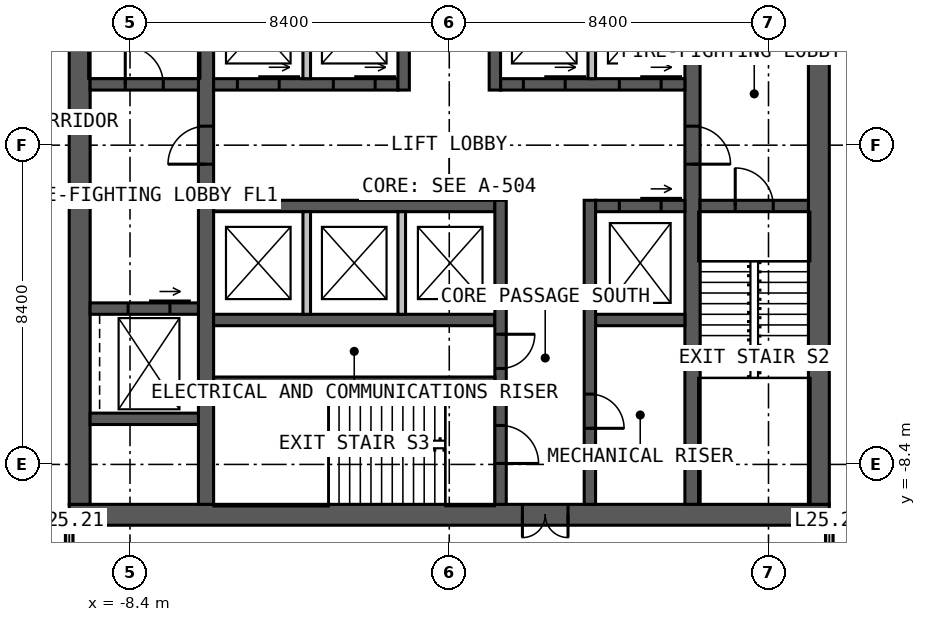
"""IFC4 building model, lengths in metres.
Left out: names, types, materials, properties, quantities, classifications, styles, units other than length and angle.
Written with IfcOpenShell. Run it as: python <this file> out.ifc"""

import sys

from ifc_helpers import new_model, si_unit, direction, frame, frame_2d, origin, place, context, subcontext, project, spatial, rectangle, extrude, element, fill, save


model = new_model("IFC4")
c1 = context("Model", 3, precision=1e-05, world=origin(), true_north=direction((0.0, 1.0)))
c2 = subcontext(c1, "Body", "Model", "MODEL_VIEW")
j1 = project(units=[si_unit("LENGTHUNIT", "METRE"), si_unit("PLANEANGLEUNIT", "RADIAN")], contexts=[c1])
p1 = place(None, origin())
s1 = spatial("IfcSite", under=j1, at=p1, CompositionType="ELEMENT")
p2 = place(p1, origin())
s2 = spatial("IfcBuilding", under=s1, at=p2, CompositionType="ELEMENT")
p3 = place(p2, frame((0.0, 0.0, 106.0)))
s3 = spatial("IfcBuildingStorey", under=s2, at=p3, CompositionType="ELEMENT", Elevation=106.0)
p4 = place(p3, frame((10.0, -9.725, 0.0), z_axis=(0.0, 0.0, 1.0), x_axis=(-1.0, 0.0, 0.0)))
e1 = element("IfcWall", 1, at=p4, inside=s3, PredefinedType="SOLIDWALL", context=c2, shape_type="SweptSolid", body=[
    extrude(rectangle(XDim=20.0, YDim=0.55, at=frame_2d((10.0, 0.0))), origin(), (0.0, 0.0, 1.0), 4.0),
])
p5 = place(p4, frame((6.875, 0.0, 0.0)))
e2 = element("IfcOpeningElement", 2, at=p5, cuts=e1, PredefinedType="OPENING", context=c2, shape_type="SweptSolid", body=[
    extrude(rectangle(XDim=1.2, YDim=2.2, at=frame_2d((0.6, 1.1))), frame((0.0, 0.285, 0.0), z_axis=(0.0, -1.0, 0.0), x_axis=(1.0, 0.0, 0.0)), (0.0, 0.0, 1.0), 0.57),
])
for number, where, z_axis, x_axis in (
    (3, (9.725, -9.45, 0.0), (0.0, 0.0, 1.0), (0.0, 1.0, 0.0)),
    (4, (-9.725, 9.45, 0.0), (0.0, 0.0, 1.0), (0.0, -1.0, 0.0)),
):
    element("IfcWall", number, at=place(p3, frame(where, z_axis=z_axis, x_axis=x_axis)), inside=s3, PredefinedType="SOLIDWALL", context=c2, shape_type="SweptSolid", body=[
        extrude(rectangle(XDim=18.9, YDim=0.55, at=frame_2d((9.45, 0.0))), origin(), (0.0, 0.0, 1.0), 4.0),
    ])
p6 = place(p3, frame((-6.4, -9.45, 0.0), z_axis=(0.0, 0.0, 1.0), x_axis=(0.0, 1.0, 0.0)))
e5 = element("IfcWall", 5, at=p6, inside=s3, PredefinedType="SOLIDWALL", context=c2, shape_type="SweptSolid", body=[
    extrude(rectangle(XDim=18.9, YDim=0.4, at=frame_2d((9.45, 0.0))), origin(), (0.0, 0.0, 1.0), 4.0),
])
p7 = place(p6, frame((8.95, 0.0, 0.0)))
e6 = element("IfcOpeningElement", 6, at=p7, cuts=e5, PredefinedType="OPENING", context=c2, shape_type="SweptSolid", body=[
    extrude(rectangle(XDim=1.0, YDim=2.2, at=frame_2d((0.5, 1.1))), frame((0.0, 0.21, 0.0), z_axis=(0.0, -1.0, 0.0), x_axis=(1.0, 0.0, 0.0)), (0.0, 0.0, 1.0), 0.42),
])
p8 = place(p3, frame((6.4, 9.45, 0.0), z_axis=(0.0, 0.0, 1.0), x_axis=(0.0, -1.0, 0.0)))
e7 = element("IfcWall", 7, at=p8, inside=s3, PredefinedType="SOLIDWALL", context=c2, shape_type="SweptSolid", body=[
    extrude(rectangle(XDim=18.9, YDim=0.4, at=frame_2d((9.45, 0.0))), origin(), (0.0, 0.0, 1.0), 4.0),
])
p9 = place(p8, frame((8.95, 0.0, 0.0)))
e8 = element("IfcOpeningElement", 8, at=p9, cuts=e7, PredefinedType="OPENING", context=c2, shape_type="SweptSolid", body=[
    extrude(rectangle(XDim=1.0, YDim=2.2, at=frame_2d((0.5, 1.1))), frame((0.0, 0.21, 0.0), z_axis=(0.0, -1.0, 0.0), x_axis=(1.0, 0.0, 0.0)), (0.0, 0.0, 1.0), 0.42),
])
p10 = place(p3, frame((-6.2, 1.6, 0.0), z_axis=(0.0, 0.0, 1.0), x_axis=(1.0, 0.0, 0.0)))
e9 = element("IfcWall", 9, at=p10, inside=s3, PredefinedType="SOLIDWALL", context=c2, shape_type="SweptSolid", body=[
    extrude(rectangle(XDim=4.85, YDim=0.3, at=frame_2d((2.425, 0.0))), origin(), (0.0, 0.0, 1.0), 4.0),
])
p11 = place(p10, frame((0.625, 0.0, 0.0)))
e10 = element("IfcOpeningElement", 10, at=p11, cuts=e9, PredefinedType="OPENING", context=c2, shape_type="SweptSolid", body=[
    extrude(rectangle(XDim=1.1, YDim=2.2, at=frame_2d((0.55, 1.1))), frame((0.0, 0.16, 0.0), z_axis=(0.0, -1.0, 0.0), x_axis=(1.0, 0.0, 0.0)), (0.0, 0.0, 1.0), 0.32),
])
p12 = place(p10, frame((3.15, 0.0, 0.0)))
e11 = element("IfcOpeningElement", 11, at=p12, cuts=e9, PredefinedType="OPENING", context=c2, shape_type="SweptSolid", body=[
    extrude(rectangle(XDim=1.1, YDim=2.2, at=frame_2d((0.55, 1.1))), frame((0.0, 0.16, 0.0), z_axis=(0.0, -1.0, 0.0), x_axis=(1.0, 0.0, 0.0)), (0.0, 0.0, 1.0), 0.32),
])
p13 = place(p3, frame((1.35, 1.6, 0.0), z_axis=(0.0, 0.0, 1.0), x_axis=(1.0, 0.0, 0.0)))
e12 = element("IfcWall", 12, at=p13, inside=s3, PredefinedType="SOLIDWALL", context=c2, shape_type="SweptSolid", body=[
    extrude(rectangle(XDim=4.85, YDim=0.3, at=frame_2d((2.425, 0.0))), origin(), (0.0, 0.0, 1.0), 4.0),
])
p14 = place(p13, frame((0.6, 0.0, 0.0)))
e13 = element("IfcOpeningElement", 13, at=p14, cuts=e12, PredefinedType="OPENING", context=c2, shape_type="SweptSolid", body=[
    extrude(rectangle(XDim=1.1, YDim=2.2, at=frame_2d((0.55, 1.1))), frame((0.0, 0.16, 0.0), z_axis=(0.0, -1.0, 0.0), x_axis=(1.0, 0.0, 0.0)), (0.0, 0.0, 1.0), 0.32),
])
p15 = place(p13, frame((3.125, 0.0, 0.0)))
e14 = element("IfcOpeningElement", 14, at=p15, cuts=e12, PredefinedType="OPENING", context=c2, shape_type="SweptSolid", body=[
    extrude(rectangle(XDim=1.1, YDim=2.2, at=frame_2d((0.55, 1.1))), frame((0.0, 0.16, 0.0), z_axis=(0.0, -1.0, 0.0), x_axis=(1.0, 0.0, 0.0)), (0.0, 0.0, 1.0), 0.32),
])
p16 = place(p3, frame((-1.2, 1.45, 0.0), z_axis=(0.0, 0.0, 1.0), x_axis=(0.0, 1.0, 0.0)))
e15 = element("IfcWall", 15, at=p16, inside=s3, PredefinedType="SOLIDWALL", context=c2, shape_type="SweptSolid", body=[
    extrude(rectangle(XDim=8.0, YDim=0.3, at=frame_2d((4.0, 0.0))), origin(), (0.0, 0.0, 1.0), 4.0),
])
p17 = place(p16, frame((5.05, 0.0, 0.0)))
e16 = element("IfcOpeningElement", 16, at=p17, cuts=e15, PredefinedType="OPENING", context=c2, shape_type="SweptSolid", body=[
    extrude(rectangle(XDim=1.0, YDim=2.2, at=frame_2d((0.5, 1.1))), frame((0.0, 0.16, 0.0), z_axis=(0.0, -1.0, 0.0), x_axis=(1.0, 0.0, 0.0)), (0.0, 0.0, 1.0), 0.32),
])
p18 = place(p3, frame((1.2, 1.45, 0.0), z_axis=(0.0, 0.0, 1.0), x_axis=(0.0, 1.0, 0.0)))
e17 = element("IfcWall", 17, at=p18, inside=s3, PredefinedType="SOLIDWALL", context=c2, shape_type="SweptSolid", body=[
    extrude(rectangle(XDim=8.0, YDim=0.3, at=frame_2d((4.0, 0.0))), origin(), (0.0, 0.0, 1.0), 4.0),
])
p19 = place(p18, frame((3.8, 0.0, 0.0)))
e18 = element("IfcOpeningElement", 18, at=p19, cuts=e17, PredefinedType="OPENING", context=c2, shape_type="SweptSolid", body=[
    extrude(rectangle(XDim=1.0, YDim=2.2, at=frame_2d((0.5, 1.1))), frame((0.0, 0.16, 0.0), z_axis=(0.0, -1.0, 0.0), x_axis=(1.0, 0.0, 0.0)), (0.0, 0.0, 1.0), 0.32),
])
p20 = place(p18, frame((6.15, 0.0, 0.0)))
e19 = element("IfcOpeningElement", 19, at=p20, cuts=e17, PredefinedType="OPENING", context=c2, shape_type="SweptSolid", body=[
    extrude(rectangle(XDim=1.0, YDim=2.2, at=frame_2d((0.5, 1.1))), frame((0.0, 0.16, 0.0), z_axis=(0.0, -1.0, 0.0), x_axis=(1.0, 0.0, 0.0)), (0.0, 0.0, 1.0), 0.32),
])
p21 = place(p3, frame((-6.2, -1.6, 0.0), z_axis=(0.0, 0.0, 1.0), x_axis=(1.0, 0.0, 0.0)))
e20 = element("IfcWall", 20, at=p21, inside=s3, PredefinedType="SOLIDWALL", context=c2, shape_type="SweptSolid", body=[
    extrude(rectangle(XDim=7.4, YDim=0.3, at=frame_2d((3.7, 0.0))), origin(), (0.0, 0.0, 1.0), 4.0),
])
p22 = place(p3, frame((3.85, -1.6, 0.0), z_axis=(0.0, 0.0, 1.0), x_axis=(1.0, 0.0, 0.0)))
e21 = element("IfcWall", 21, at=p22, inside=s3, PredefinedType="SOLIDWALL", context=c2, shape_type="SweptSolid", body=[
    extrude(rectangle(XDim=2.35, YDim=0.3, at=frame_2d((1.175, 0.0))), origin(), (0.0, 0.0, 1.0), 4.0),
])
p23 = place(p22, frame((0.625, 0.0, 0.0)))
e22 = element("IfcOpeningElement", 22, at=p23, cuts=e21, PredefinedType="OPENING", context=c2, shape_type="SweptSolid", body=[
    extrude(rectangle(XDim=1.1, YDim=2.2, at=frame_2d((0.55, 1.1))), frame((0.0, 0.16, 0.0), z_axis=(0.0, -1.0, 0.0), x_axis=(1.0, 0.0, 0.0)), (0.0, 0.0, 1.0), 0.32),
])
p24 = place(p3, frame((-6.2, -4.6, 0.0), z_axis=(0.0, 0.0, 1.0), x_axis=(1.0, 0.0, 0.0)))
e23 = element("IfcWall", 23, at=p24, inside=s3, PredefinedType="SOLIDWALL", context=c2, shape_type="SweptSolid", body=[
    extrude(rectangle(XDim=7.4, YDim=0.3, at=frame_2d((3.7, 0.0))), origin(), (0.0, 0.0, 1.0), 4.0),
])
p25 = place(p3, frame((3.85, -4.6, 0.0), z_axis=(0.0, 0.0, 1.0), x_axis=(1.0, 0.0, 0.0)))
e24 = element("IfcWall", 24, at=p25, inside=s3, PredefinedType="SOLIDWALL", context=c2, shape_type="SweptSolid", body=[
    extrude(rectangle(XDim=2.35, YDim=0.3, at=frame_2d((1.175, 0.0))), origin(), (0.0, 0.0, 1.0), 4.0),
])
p26 = place(p3, frame((1.35, -1.45, 0.0), z_axis=(0.0, 0.0, 1.0), x_axis=(0.0, -1.0, 0.0)))
e25 = element("IfcWall", 25, at=p26, inside=s3, PredefinedType="SOLIDWALL", context=c2, shape_type="SweptSolid", body=[
    extrude(rectangle(XDim=8.0, YDim=0.3, at=frame_2d((4.0, 0.0))), origin(), (0.0, 0.0, 1.0), 4.0),
])
p27 = place(p26, frame((5.925, 0.0, 0.0)))
e26 = element("IfcOpeningElement", 26, at=p27, cuts=e25, PredefinedType="OPENING", context=c2, shape_type="SweptSolid", body=[
    extrude(rectangle(XDim=1.0, YDim=2.2, at=frame_2d((0.5, 1.1))), frame((0.0, 0.16, 0.0), z_axis=(0.0, -1.0, 0.0), x_axis=(1.0, 0.0, 0.0)), (0.0, 0.0, 1.0), 0.32),
])
p28 = place(p26, frame((3.525, 0.0, 0.0)))
e27 = element("IfcOpeningElement", 27, at=p28, cuts=e25, PredefinedType="OPENING", context=c2, shape_type="SweptSolid", body=[
    extrude(rectangle(XDim=0.9, YDim=2.2, at=frame_2d((0.45, 1.1))), frame((0.0, 0.16, 0.0), z_axis=(0.0, -1.0, 0.0), x_axis=(1.0, 0.0, 0.0)), (0.0, 0.0, 1.0), 0.32),
])
p29 = place(p3, frame((3.7, -1.45, 0.0), z_axis=(0.0, 0.0, 1.0), x_axis=(0.0, -1.0, 0.0)))
e28 = element("IfcWall", 28, at=p29, inside=s3, PredefinedType="SOLIDWALL", context=c2, shape_type="SweptSolid", body=[
    extrude(rectangle(XDim=8.0, YDim=0.3, at=frame_2d((4.0, 0.0))), origin(), (0.0, 0.0, 1.0), 4.0),
])
p30 = place(p29, frame((5.1, 0.0, 0.0)))
e29 = element("IfcOpeningElement", 29, at=p30, cuts=e28, PredefinedType="OPENING", context=c2, shape_type="SweptSolid", body=[
    extrude(rectangle(XDim=0.9, YDim=2.2, at=frame_2d((0.45, 1.1))), frame((0.0, 0.16, 0.0), z_axis=(0.0, -1.0, 0.0), x_axis=(1.0, 0.0, 0.0)), (0.0, 0.0, 1.0), 0.32),
])
p31 = place(p3, frame((-6.2, -6.2, 0.0), z_axis=(0.0, 0.0, 1.0), x_axis=(1.0, 0.0, 0.0)))
e30 = element("IfcWall", 30, at=p31, inside=s3, PredefinedType="SOLIDWALL", context=c2, shape_type="SweptSolid", body=[
    extrude(rectangle(XDim=7.4, YDim=0.2, at=frame_2d((3.7, 0.0))), origin(), (0.0, 0.0, 1.0), 4.0),
])
p32 = place(p3, frame((-9.45, 1.6, 0.0), z_axis=(0.0, 0.0, 1.0), x_axis=(1.0, 0.0, 0.0)))
e31 = element("IfcWall", 31, at=p32, inside=s3, PredefinedType="SOLIDWALL", context=c2, shape_type="SweptSolid", body=[
    extrude(rectangle(XDim=2.85, YDim=0.3, at=frame_2d((1.425, 0.0))), origin(), (0.0, 0.0, 1.0), 4.0),
])
p33 = place(p32, frame((0.925, 0.0, 0.0)))
e32 = element("IfcOpeningElement", 32, at=p33, cuts=e31, PredefinedType="OPENING", context=c2, shape_type="SweptSolid", body=[
    extrude(rectangle(XDim=1.0, YDim=2.2, at=frame_2d((0.5, 1.1))), frame((0.0, 0.16, 0.0), z_axis=(0.0, -1.0, 0.0), x_axis=(1.0, 0.0, 0.0)), (0.0, 0.0, 1.0), 0.32),
])
p34 = place(p3, frame((6.6, -1.6, 0.0), z_axis=(0.0, 0.0, 1.0), x_axis=(1.0, 0.0, 0.0)))
e33 = element("IfcWall", 33, at=p34, inside=s3, PredefinedType="SOLIDWALL", context=c2, shape_type="SweptSolid", body=[
    extrude(rectangle(XDim=2.85, YDim=0.3, at=frame_2d((1.425, 0.0))), origin(), (0.0, 0.0, 1.0), 4.0),
])
p35 = place(p34, frame((0.925, 0.0, 0.0)))
e34 = element("IfcOpeningElement", 34, at=p35, cuts=e33, PredefinedType="OPENING", context=c2, shape_type="SweptSolid", body=[
    extrude(rectangle(XDim=1.0, YDim=2.2, at=frame_2d((0.5, 1.1))), frame((0.0, 0.16, 0.0), z_axis=(0.0, -1.0, 0.0), x_axis=(1.0, 0.0, 0.0)), (0.0, 0.0, 1.0), 0.32),
])
p36 = place(p3, frame((-9.45, -4.3, 0.0), z_axis=(0.0, 0.0, 1.0), x_axis=(1.0, 0.0, 0.0)))
e35 = element("IfcWall", 35, at=p36, inside=s3, PredefinedType="SOLIDWALL", context=c2, shape_type="SweptSolid", body=[
    extrude(rectangle(XDim=2.85, YDim=0.3, at=frame_2d((1.425, 0.0))), origin(), (0.0, 0.0, 1.0), 4.0),
])
p37 = place(p36, frame((1.0, 0.0, 0.0)))
e36 = element("IfcOpeningElement", 36, at=p37, cuts=e35, PredefinedType="OPENING", context=c2, shape_type="SweptSolid", body=[
    extrude(rectangle(XDim=1.1, YDim=2.2, at=frame_2d((0.55, 1.1))), frame((0.0, 0.16, 0.0), z_axis=(0.0, -1.0, 0.0), x_axis=(1.0, 0.0, 0.0)), (0.0, 0.0, 1.0), 0.32),
])
p38 = place(p3, frame((-9.45, -7.2, 0.0), z_axis=(0.0, 0.0, 1.0), x_axis=(1.0, 0.0, 0.0)))
e37 = element("IfcWall", 37, at=p38, inside=s3, PredefinedType="SOLIDWALL", context=c2, shape_type="SweptSolid", body=[
    extrude(rectangle(XDim=2.85, YDim=0.3, at=frame_2d((1.425, 0.0))), origin(), (0.0, 0.0, 1.0), 4.0),
])
for number, where, z_axis, x_axis in (
    (38, (-3.75, 1.75, 0.0), (0.0, 0.0, 1.0), (0.0, 1.0, 0.0)),
    (39, (3.75, 1.75, 0.0), (0.0, 0.0, 1.0), (0.0, 1.0, 0.0)),
    (40, (-3.75, -1.75, 0.0), (0.0, 0.0, 1.0), (0.0, -1.0, 0.0)),
    (41, (-1.25, -1.75, 0.0), (0.0, 0.0, 1.0), (0.0, -1.0, 0.0)),
):
    element("IfcWall", number, at=place(p3, frame(where, z_axis=z_axis, x_axis=x_axis)), inside=s3, PredefinedType="SOLIDWALL", context=c2, shape_type="SweptSolid", body=[
        extrude(rectangle(XDim=2.7, YDim=0.2, at=frame_2d((1.35, 0.0))), origin(), (0.0, 0.0, 1.0), 3.75),
    ])
p39 = place(p3, frame((10.0, -10.0, 0.0), z_axis=(0.0, 0.0, 1.0), x_axis=(0.0, -1.0, 0.0)))
e42 = element("IfcWall", 42, at=p39, inside=s3, PredefinedType="PARTITIONING", context=c2, shape_type="SweptSolid", body=[
    extrude(rectangle(XDim=2.0, YDim=0.2, at=frame_2d((1.0, 0.0))), origin(), (0.0, 0.0, 1.0), 3.8),
])
p40 = place(p39, frame((0.5, 0.0, 0.0)))
e43 = element("IfcOpeningElement", 43, at=p40, cuts=e42, PredefinedType="OPENING", context=c2, shape_type="SweptSolid", body=[
    extrude(rectangle(XDim=1.0, YDim=2.2, at=frame_2d((0.5, 1.1))), frame((0.0, 0.11, 0.0), z_axis=(0.0, -1.0, 0.0), x_axis=(1.0, 0.0, 0.0)), (0.0, 0.0, 1.0), 0.22),
])
p41 = place(p3, frame((-10.0, -10.0, 0.0), z_axis=(0.0, 0.0, 1.0), x_axis=(0.0, -1.0, 0.0)))
e44 = element("IfcWall", 44, at=p41, inside=s3, PredefinedType="PARTITIONING", context=c2, shape_type="SweptSolid", body=[
    extrude(rectangle(XDim=2.0, YDim=0.2, at=frame_2d((1.0, 0.0))), origin(), (0.0, 0.0, 1.0), 3.8),
])
p42 = place(p41, frame((0.5, 0.0, 0.0)))
e45 = element("IfcOpeningElement", 45, at=p42, cuts=e44, PredefinedType="OPENING", context=c2, shape_type="SweptSolid", body=[
    extrude(rectangle(XDim=1.0, YDim=2.2, at=frame_2d((0.5, 1.1))), frame((0.0, 0.11, 0.0), z_axis=(0.0, -1.0, 0.0), x_axis=(1.0, 0.0, 0.0)), (0.0, 0.0, 1.0), 0.22),
])
p43 = place(p5, origin())
e46 = element("IfcDoor", 46, at=p43, inside=s3, OperationType="DOUBLE_DOOR_SINGLE_SWING", PredefinedType="DOOR", context=c2, shape_type="SweptSolid", body=[
    extrude(rectangle(XDim=1.2, YDim=2.2, at=frame_2d((0.6, 1.1))), frame((0.0, 0.025, 0.0), z_axis=(0.0, -1.0, 0.0), x_axis=(1.0, 0.0, 0.0)), (0.0, 0.0, 1.0), 0.05),
])
fill(e2, e46)
p44 = place(p7, origin())
e47 = element("IfcDoor", 47, at=p44, inside=s3, OperationType="SINGLE_SWING_LEFT", PredefinedType="DOOR", context=c2, shape_type="SweptSolid", body=[
    extrude(rectangle(XDim=1.0, YDim=2.2, at=frame_2d((0.5, 1.1))), frame((0.0, 0.025, 0.0), z_axis=(0.0, -1.0, 0.0), x_axis=(1.0, 0.0, 0.0)), (0.0, 0.0, 1.0), 0.05),
])
fill(e6, e47)
p45 = place(p9, origin())
e48 = element("IfcDoor", 48, at=p45, inside=s3, OperationType="SINGLE_SWING_RIGHT", PredefinedType="DOOR", context=c2, shape_type="SweptSolid", body=[
    extrude(rectangle(XDim=1.0, YDim=2.2, at=frame_2d((0.5, 1.1))), frame((0.0, 0.025, 0.0), z_axis=(0.0, -1.0, 0.0), x_axis=(1.0, 0.0, 0.0)), (0.0, 0.0, 1.0), 0.05),
])
fill(e8, e48)
p46 = place(p33, origin())
e49 = element("IfcDoor", 49, at=p46, inside=s3, OperationType="SINGLE_SWING_LEFT", PredefinedType="DOOR", context=c2, shape_type="SweptSolid", body=[
    extrude(rectangle(XDim=1.0, YDim=2.2, at=frame_2d((0.5, 1.1))), frame((0.0, 0.025, 0.0), z_axis=(0.0, -1.0, 0.0), x_axis=(1.0, 0.0, 0.0)), (0.0, 0.0, 1.0), 0.05),
])
fill(e32, e49)
p47 = place(p35, origin())
e50 = element("IfcDoor", 50, at=p47, inside=s3, OperationType="SINGLE_SWING_LEFT", PredefinedType="DOOR", context=c2, shape_type="SweptSolid", body=[
    extrude(rectangle(XDim=1.0, YDim=2.2, at=frame_2d((0.5, 1.1))), frame((0.0, 0.025, 0.0), z_axis=(0.0, -1.0, 0.0), x_axis=(1.0, 0.0, 0.0)), (0.0, 0.0, 1.0), 0.05),
])
fill(e34, e50)
p48 = place(p27, origin())
e51 = element("IfcDoor", 51, at=p48, inside=s3, OperationType="SINGLE_SWING_RIGHT", PredefinedType="DOOR", context=c2, shape_type="SweptSolid", body=[
    extrude(rectangle(XDim=1.0, YDim=2.2, at=frame_2d((0.5, 1.1))), frame((0.0, 0.025, 0.0), z_axis=(0.0, -1.0, 0.0), x_axis=(1.0, 0.0, 0.0)), (0.0, 0.0, 1.0), 0.05),
])
fill(e26, e51)
p49 = place(p28, origin())
e52 = element("IfcDoor", 52, at=p49, inside=s3, OperationType="SINGLE_SWING_LEFT", PredefinedType="DOOR", context=c2, shape_type="SweptSolid", body=[
    extrude(rectangle(XDim=0.9, YDim=2.2, at=frame_2d((0.45, 1.1))), frame((0.0, 0.025, 0.0), z_axis=(0.0, -1.0, 0.0), x_axis=(1.0, 0.0, 0.0)), (0.0, 0.0, 1.0), 0.05),
])
fill(e27, e52)
p50 = place(p30, origin())
e53 = element("IfcDoor", 53, at=p50, inside=s3, OperationType="SINGLE_SWING_RIGHT", PredefinedType="DOOR", context=c2, shape_type="SweptSolid", body=[
    extrude(rectangle(XDim=0.9, YDim=2.2, at=frame_2d((0.45, 1.1))), frame((0.0, 0.025, 0.0), z_axis=(0.0, -1.0, 0.0), x_axis=(1.0, 0.0, 0.0)), (0.0, 0.0, 1.0), 0.05),
])
fill(e29, e53)
p51 = place(p11, origin())
e54 = element("IfcDoor", 54, at=p51, inside=s3, OperationType="SLIDING_TO_LEFT", PredefinedType="DOOR", context=c2, shape_type="SweptSolid", body=[
    extrude(rectangle(XDim=1.1, YDim=2.2, at=frame_2d((0.55, 1.1))), frame((0.0, 0.025, 0.0), z_axis=(0.0, -1.0, 0.0), x_axis=(1.0, 0.0, 0.0)), (0.0, 0.0, 1.0), 0.05),
])
fill(e10, e54)
p52 = place(p12, origin())
e55 = element("IfcDoor", 55, at=p52, inside=s3, OperationType="SLIDING_TO_LEFT", PredefinedType="DOOR", context=c2, shape_type="SweptSolid", body=[
    extrude(rectangle(XDim=1.1, YDim=2.2, at=frame_2d((0.55, 1.1))), frame((0.0, 0.025, 0.0), z_axis=(0.0, -1.0, 0.0), x_axis=(1.0, 0.0, 0.0)), (0.0, 0.0, 1.0), 0.05),
])
fill(e11, e55)
p53 = place(p14, origin())
e56 = element("IfcDoor", 56, at=p53, inside=s3, OperationType="SLIDING_TO_LEFT", PredefinedType="DOOR", context=c2, shape_type="SweptSolid", body=[
    extrude(rectangle(XDim=1.1, YDim=2.2, at=frame_2d((0.55, 1.1))), frame((0.0, 0.025, 0.0), z_axis=(0.0, -1.0, 0.0), x_axis=(1.0, 0.0, 0.0)), (0.0, 0.0, 1.0), 0.05),
])
fill(e13, e56)
p54 = place(p15, origin())
e57 = element("IfcDoor", 57, at=p54, inside=s3, OperationType="SLIDING_TO_LEFT", PredefinedType="DOOR", context=c2, shape_type="SweptSolid", body=[
    extrude(rectangle(XDim=1.1, YDim=2.2, at=frame_2d((0.55, 1.1))), frame((0.0, 0.025, 0.0), z_axis=(0.0, -1.0, 0.0), x_axis=(1.0, 0.0, 0.0)), (0.0, 0.0, 1.0), 0.05),
])
fill(e14, e57)
p55 = place(p23, origin())
e58 = element("IfcDoor", 58, at=p55, inside=s3, OperationType="SLIDING_TO_LEFT", PredefinedType="DOOR", context=c2, shape_type="SweptSolid", body=[
    extrude(rectangle(XDim=1.1, YDim=2.2, at=frame_2d((0.55, 1.1))), frame((0.0, 0.025, 0.0), z_axis=(0.0, -1.0, 0.0), x_axis=(1.0, 0.0, 0.0)), (0.0, 0.0, 1.0), 0.05),
])
fill(e22, e58)
p56 = place(p37, origin())
e59 = element("IfcDoor", 59, at=p56, inside=s3, OperationType="SLIDING_TO_LEFT", PredefinedType="DOOR", context=c2, shape_type="SweptSolid", body=[
    extrude(rectangle(XDim=1.1, YDim=2.2, at=frame_2d((0.55, 1.1))), frame((0.0, 0.025, 0.0), z_axis=(0.0, -1.0, 0.0), x_axis=(1.0, 0.0, 0.0)), (0.0, 0.0, 1.0), 0.05),
])
fill(e36, e59)
save(model, sys.argv[1])
